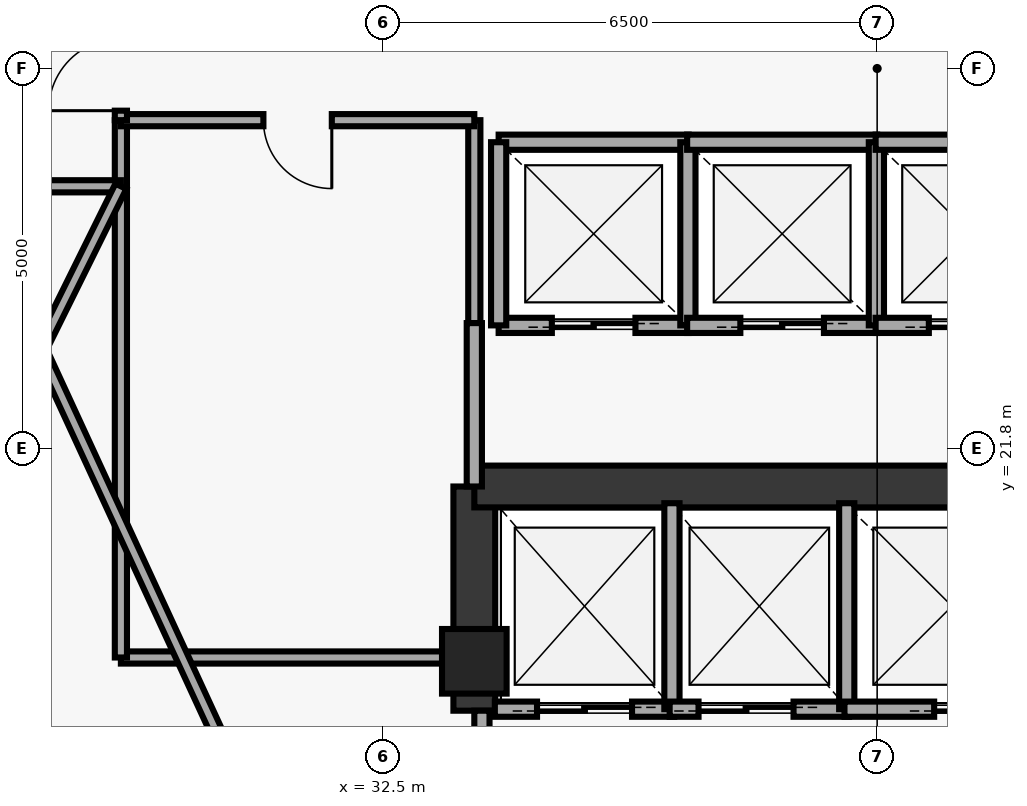
"""IFC4 building model, lengths in metres.
Left out: names, types, materials, properties, quantities, classifications, styles, units other than length and angle.
Written with IfcOpenShell. Run it as: python <this file> out.ifc"""

import sys

from ifc_helpers import new_model, si_unit, direction, frame, frame_2d, origin, origin_2d, place, context, subcontext, project, spatial, rectangle, extrude, element, fill, save


model = new_model("IFC4")
c1 = context("Model", 3, precision=1e-05, world=origin(), true_north=direction((0.0, 1.0)))
c2 = subcontext(c1, "Body", "Model", "MODEL_VIEW")
j1 = project(units=[si_unit("LENGTHUNIT", "METRE"), si_unit("PLANEANGLEUNIT", "RADIAN")], contexts=[c1])
p1 = place(None, origin())
s1 = spatial("IfcSite", under=j1, at=p1, CompositionType="ELEMENT")
p2 = place(p1, origin())
s2 = spatial("IfcBuilding", under=s1, at=p2, CompositionType="ELEMENT")
p3 = place(p2, frame((0.0, 0.0, 251.95)))
s3 = spatial("IfcBuildingStorey", under=s2, at=p3, CompositionType="ELEMENT", Elevation=251.95)
p4 = place(p3, frame((33.7, 19.0, 0.0), z_axis=(0.0, 0.0, 1.0), x_axis=(1.0, 0.0, 0.0)))
e1 = element("IfcColumn", 1, at=p4, inside=s3, PredefinedType="PILASTER", context=c2, shape_type="SweptSolid", body=[
    extrude(rectangle(XDim=0.85, YDim=0.85, at=origin_2d()), origin(), (0.0, 0.0, 1.0), 3.39),
])
p5 = place(p3, frame((33.7, 18.35, 0.0), z_axis=(0.0, 0.0, 1.0), x_axis=(0.0, 1.0, 0.0)))
e2 = element("IfcWall", 2, at=p5, inside=s3, PredefinedType="SHEAR", context=c2, shape_type="SweptSolid", body=[
    extrude(rectangle(XDim=2.95, YDim=0.55, at=frame_2d((1.475, 0.0))), origin(), (0.0, 0.0, 1.0), 3.39),
])
p6 = place(p3, frame((33.7, 21.3, 0.0), z_axis=(0.0, 0.0, 1.0), x_axis=(1.0, 0.0, 0.0)))
e3 = element("IfcWall", 3, at=p6, inside=s3, PredefinedType="SHEAR", context=c2, shape_type="SweptSolid", body=[
    extrude(rectangle(XDim=7.55, YDim=0.55, at=frame_2d((3.775, 0.0))), origin(), (0.0, 0.0, 1.0), 3.39),
])
p7 = place(p3, frame((34.02, 23.42, 0.0), z_axis=(0.0, 0.0, 1.0), x_axis=(1.0, 0.0, 0.0)))
e4 = element("IfcWall", 4, at=p7, inside=s3, PredefinedType="SOLIDWALL", context=c2, shape_type="SweptSolid", body=[
    extrude(rectangle(XDim=2.5, YDim=0.2, at=frame_2d((1.25, 0.0))), origin(), (0.0, 0.0, 1.0), 3.39),
])
p8 = place(p7, frame((0.7, 0.0, 0.0)))
e5 = element("IfcOpeningElement", 5, at=p8, cuts=e4, PredefinedType="OPENING", context=c2, shape_type="SweptSolid", body=[
    extrude(rectangle(XDim=1.1, YDim=2.15, at=frame_2d((0.55, 1.075))), frame((0.0, 0.11, 0.0), z_axis=(0.0, -1.0, 0.0), x_axis=(1.0, 0.0, 0.0)), (0.0, 0.0, 1.0), 0.22),
])
p9 = place(p3, frame((34.02, 25.83, 0.0), z_axis=(0.0, 0.0, 1.0), x_axis=(1.0, 0.0, 0.0)))
e6 = element("IfcWall", 6, at=p9, inside=s3, PredefinedType="SOLIDWALL", context=c2, shape_type="SweptSolid", body=[
    extrude(rectangle(XDim=2.5, YDim=0.2, at=frame_2d((1.25, 0.0))), origin(), (0.0, 0.0, 1.0), 3.39),
])
for number, where, z_axis, x_axis in (
    (7, (34.02, 23.42, 0.0), (0.0, 0.0, 1.0), (0.0, 1.0, 0.0)),
    (8, (36.51, 23.42, 0.0), (0.0, 0.0, 1.0), (0.0, 1.0, 0.0)),
):
    element("IfcWall", number, at=place(p3, frame(where, z_axis=z_axis, x_axis=x_axis)), inside=s3, PredefinedType="SOLIDWALL", context=c2, shape_type="SweptSolid", body=[
        extrude(rectangle(XDim=2.41, YDim=0.2, at=frame_2d((1.205, 0.0))), origin(), (0.0, 0.0, 1.0), 3.39),
    ])
p10 = place(p3, frame((36.5, 23.42, 0.0), z_axis=(0.0, 0.0, 1.0), x_axis=(1.0, 0.0, 0.0)))
e9 = element("IfcWall", 9, at=p10, inside=s3, PredefinedType="SOLIDWALL", context=c2, shape_type="SweptSolid", body=[
    extrude(rectangle(XDim=2.5, YDim=0.2, at=frame_2d((1.25, 0.0))), origin(), (0.0, 0.0, 1.0), 3.39),
])
p11 = place(p10, frame((0.7, 0.0, 0.0)))
e10 = element("IfcOpeningElement", 10, at=p11, cuts=e9, PredefinedType="OPENING", context=c2, shape_type="SweptSolid", body=[
    extrude(rectangle(XDim=1.1, YDim=2.15, at=frame_2d((0.55, 1.075))), frame((0.0, 0.11, 0.0), z_axis=(0.0, -1.0, 0.0), x_axis=(1.0, 0.0, 0.0)), (0.0, 0.0, 1.0), 0.22),
])
p12 = place(p3, frame((36.5, 25.83, 0.0), z_axis=(0.0, 0.0, 1.0), x_axis=(1.0, 0.0, 0.0)))
e11 = element("IfcWall", 11, at=p12, inside=s3, PredefinedType="SOLIDWALL", context=c2, shape_type="SweptSolid", body=[
    extrude(rectangle(XDim=2.5, YDim=0.2, at=frame_2d((1.25, 0.0))), origin(), (0.0, 0.0, 1.0), 3.39),
])
p13 = place(p3, frame((38.99, 23.42, 0.0), z_axis=(0.0, 0.0, 1.0), x_axis=(0.0, 1.0, 0.0)))
e12 = element("IfcWall", 12, at=p13, inside=s3, PredefinedType="SOLIDWALL", context=c2, shape_type="SweptSolid", body=[
    extrude(rectangle(XDim=2.41, YDim=0.2, at=frame_2d((1.205, 0.0))), origin(), (0.0, 0.0, 1.0), 3.39),
])
p14 = place(p3, frame((38.98, 23.42, 0.0), z_axis=(0.0, 0.0, 1.0), x_axis=(1.0, 0.0, 0.0)))
e13 = element("IfcWall", 13, at=p14, inside=s3, PredefinedType="SOLIDWALL", context=c2, shape_type="SweptSolid", body=[
    extrude(rectangle(XDim=2.5, YDim=0.2, at=frame_2d((1.25, 0.0))), origin(), (0.0, 0.0, 1.0), 3.39),
])
p15 = place(p14, frame((0.7, 0.0, 0.0)))
e14 = element("IfcOpeningElement", 14, at=p15, cuts=e13, PredefinedType="OPENING", context=c2, shape_type="SweptSolid", body=[
    extrude(rectangle(XDim=1.1, YDim=2.15, at=frame_2d((0.55, 1.075))), frame((0.0, 0.11, 0.0), z_axis=(0.0, -1.0, 0.0), x_axis=(1.0, 0.0, 0.0)), (0.0, 0.0, 1.0), 0.22),
])
p16 = place(p3, frame((38.98, 25.83, 0.0), z_axis=(0.0, 0.0, 1.0), x_axis=(1.0, 0.0, 0.0)))
e15 = element("IfcWall", 15, at=p16, inside=s3, PredefinedType="SOLIDWALL", context=c2, shape_type="SweptSolid", body=[
    extrude(rectangle(XDim=2.5, YDim=0.2, at=frame_2d((1.25, 0.0))), origin(), (0.0, 0.0, 1.0), 3.39),
])
p17 = place(p3, frame((33.97, 18.37, 0.0), z_axis=(0.0, 0.0, 1.0), x_axis=(1.0, 0.0, 0.0)))
e16 = element("IfcWall", 16, at=p17, inside=s3, PredefinedType="SOLIDWALL", context=c2, shape_type="SweptSolid", body=[
    extrude(rectangle(XDim=2.36, YDim=0.2, at=frame_2d((1.18, 0.0))), origin(), (0.0, 0.0, 1.0), 3.39),
])
p18 = place(p17, frame((0.555, 0.0, 0.0)))
e17 = element("IfcOpeningElement", 17, at=p18, cuts=e16, PredefinedType="OPENING", context=c2, shape_type="SweptSolid", body=[
    extrude(rectangle(XDim=1.25, YDim=2.2, at=frame_2d((0.625, 1.1))), frame((0.0, 0.11, 0.0), z_axis=(0.0, -1.0, 0.0), x_axis=(1.0, 0.0, 0.0)), (0.0, 0.0, 1.0), 0.22),
])
p19 = place(p3, frame((36.3, 18.37, 0.0), z_axis=(0.0, 0.0, 1.0), x_axis=(0.0, 1.0, 0.0)))
e18 = element("IfcWall", 18, at=p19, inside=s3, PredefinedType="SOLIDWALL", context=c2, shape_type="SweptSolid", body=[
    extrude(rectangle(XDim=2.71, YDim=0.2, at=frame_2d((1.355, 0.0))), origin(), (0.0, 0.0, 1.0), 3.39),
])
p20 = place(p3, frame((36.27, 18.37, 0.0), z_axis=(0.0, 0.0, 1.0), x_axis=(1.0, 0.0, 0.0)))
e19 = element("IfcWall", 19, at=p20, inside=s3, PredefinedType="SOLIDWALL", context=c2, shape_type="SweptSolid", body=[
    extrude(rectangle(XDim=2.36, YDim=0.2, at=frame_2d((1.18, 0.0))), origin(), (0.0, 0.0, 1.0), 3.39),
])
p21 = place(p20, frame((0.38, 0.0, 0.0)))
e20 = element("IfcOpeningElement", 20, at=p21, cuts=e19, PredefinedType="OPENING", context=c2, shape_type="SweptSolid", body=[
    extrude(rectangle(XDim=1.25, YDim=2.2, at=frame_2d((0.625, 1.1))), frame((0.0, 0.11, 0.0), z_axis=(0.0, -1.0, 0.0), x_axis=(1.0, 0.0, 0.0)), (0.0, 0.0, 1.0), 0.22),
])
p22 = place(p3, frame((38.6, 18.37, 0.0), z_axis=(0.0, 0.0, 1.0), x_axis=(0.0, 1.0, 0.0)))
e21 = element("IfcWall", 21, at=p22, inside=s3, PredefinedType="SOLIDWALL", context=c2, shape_type="SweptSolid", body=[
    extrude(rectangle(XDim=2.71, YDim=0.2, at=frame_2d((1.355, 0.0))), origin(), (0.0, 0.0, 1.0), 3.39),
])
p23 = place(p3, frame((38.57, 18.37, 0.0), z_axis=(0.0, 0.0, 1.0), x_axis=(1.0, 0.0, 0.0)))
e22 = element("IfcWall", 22, at=p23, inside=s3, PredefinedType="SOLIDWALL", context=c2, shape_type="SweptSolid", body=[
    extrude(rectangle(XDim=2.83, YDim=0.2, at=frame_2d((1.415, 0.0))), origin(), (0.0, 0.0, 1.0), 3.39),
])
p24 = place(p23, frame((1.18, 0.0, 0.0)))
e23 = element("IfcOpeningElement", 23, at=p24, cuts=e22, PredefinedType="OPENING", context=c2, shape_type="SweptSolid", body=[
    extrude(rectangle(XDim=1.35, YDim=2.02, at=frame_2d((0.675, 1.01))), frame((0.0, 0.11, 0.0), z_axis=(0.0, -1.0, 0.0), x_axis=(1.0, 0.0, 0.0)), (0.0, 0.0, 1.0), 0.22),
])
p25 = place(p3, frame((29.05, 19.05, 0.0), z_axis=(0.0, 0.0, 1.0), x_axis=(1.0, 0.0, 0.0)))
e24 = element("IfcWall", 24, at=p25, inside=s3, PredefinedType="PARTITIONING", context=c2, shape_type="SweptSolid", body=[
    extrude(rectangle(XDim=4.65, YDim=0.16, at=frame_2d((2.325, 0.0))), origin(), (0.0, 0.0, 1.0), 3.39),
])
p26 = place(p3, frame((29.05, 19.05, 0.0), z_axis=(0.0, 0.0, 1.0), x_axis=(0.0, 1.0, 0.0)))
e25 = element("IfcWall", 25, at=p26, inside=s3, PredefinedType="PARTITIONING", context=c2, shape_type="SweptSolid", body=[
    extrude(rectangle(XDim=7.07, YDim=0.16, at=frame_2d((3.535, 0.0))), origin(), (0.0, 0.0, 1.0), 3.39),
])
p27 = place(p3, frame((33.7, 23.45, 0.0), z_axis=(0.0, 0.0, 1.0), x_axis=(0.0, 1.0, 0.0)))
e26 = element("IfcWall", 26, at=p27, inside=s3, PredefinedType="PARTITIONING", context=c2, shape_type="SweptSolid", body=[
    extrude(rectangle(XDim=2.67, YDim=0.16, at=frame_2d((1.335, 0.0))), origin(), (0.0, 0.0, 1.0), 2.775),
])
p28 = place(p3, frame((33.7, 26.12, 0.0), z_axis=(0.0, 0.0, 1.0), x_axis=(-1.0, 0.0, 0.0)))
e27 = element("IfcWall", 27, at=p28, inside=s3, PredefinedType="PARTITIONING", context=c2, shape_type="SweptSolid", body=[
    extrude(rectangle(XDim=4.65, YDim=0.16, at=frame_2d((2.325, 0.0))), origin(), (0.0, 0.0, 1.0), 3.39),
])
p29 = place(p28, frame((1.875, 0.0, 0.0)))
e28 = element("IfcOpeningElement", 28, at=p29, cuts=e27, PredefinedType="OPENING", context=c2, shape_type="SweptSolid", body=[
    extrude(rectangle(XDim=0.9, YDim=2.02, at=frame_2d((0.45, 1.01))), frame((0.0, 0.09, 0.0), z_axis=(0.0, -1.0, 0.0), x_axis=(1.0, 0.0, 0.0)), (0.0, 0.0, 1.0), 0.18),
])
p30 = place(p3, frame((33.7, 21.3, 0.0), z_axis=(0.0, 0.0, 1.0), x_axis=(0.0, 1.0, 0.0)))
e29 = element("IfcWall", 29, at=p30, inside=s3, PredefinedType="SOLIDWALL", context=c2, shape_type="SweptSolid", body=[
    extrude(rectangle(XDim=2.15, YDim=0.2, at=frame_2d((1.075, 0.0))), origin(), (0.0, 0.0, 1.0), 2.775),
])
p31 = place(p3, frame((33.8, 15.55, 0.0), z_axis=(0.0, 0.0, 1.0), x_axis=(0.0, 1.0, 0.0)))
e30 = element("IfcWall", 30, at=p31, inside=s3, PredefinedType="SOLIDWALL", context=c2, shape_type="SweptSolid", body=[
    extrude(rectangle(XDim=2.8, YDim=0.2, at=frame_2d((1.4, 0.0))), origin(), (0.0, 0.0, 1.0), 3.39),
])
p32 = place(p3, frame((29.05, 26.12, 0.0), z_axis=(0.0, 0.0, 1.0), x_axis=(0.0, 1.0, 0.0)))
e31 = element("IfcWall", 31, at=p32, inside=s3, PredefinedType="PARTITIONING", context=c2, shape_type="SweptSolid", body=[
    extrude(rectangle(XDim=1.2, YDim=0.16, at=frame_2d((0.6, 0.0))), origin(), (0.0, 0.0, 1.0), 3.39),
])
p33 = place(p32, frame((0.125, 0.0, 0.0)))
e32 = element("IfcOpeningElement", 32, at=p33, cuts=e31, PredefinedType="OPENING", context=c2, shape_type="SweptSolid", body=[
    extrude(rectangle(XDim=0.95, YDim=2.15, at=frame_2d((0.475, 1.075))), frame((0.0, 0.09, 0.0), z_axis=(0.0, -1.0, 0.0), x_axis=(1.0, 0.0, 0.0)), (0.0, 0.0, 1.0), 0.18),
])
p34 = place(p3, frame((27.988, 23.104, 0.0), z_axis=(0.0, 0.0, 1.0), x_axis=(0.418656179426, -0.908144814128, 0.0)))
e33 = element("IfcWall", 33, at=p34, inside=s3, PredefinedType="PARTITIONING", context=c2, shape_type="SweptSolid", body=[
    extrude(rectangle(XDim=7.049, YDim=0.16, at=frame_2d((3.524, 0.0))), origin(), (0.0, 0.0, 1.0), 3.39),
])
p35 = place(p3, frame((26.25, 25.25, 0.0), z_axis=(0.0, 0.0, 1.0), x_axis=(1.0, 0.0, 0.0)))
e34 = element("IfcWall", 34, at=p35, inside=s3, PredefinedType="PARTITIONING", context=c2, shape_type="SweptSolid", body=[
    extrude(rectangle(XDim=2.8, YDim=0.16, at=frame_2d((1.4, 0.0))), origin(), (0.0, 0.0, 1.0), 3.39),
])
p36 = place(p35, frame((0.65, 0.0, 0.0)))
e35 = element("IfcOpeningElement", 35, at=p36, cuts=e34, PredefinedType="OPENING", context=c2, shape_type="SweptSolid", body=[
    extrude(rectangle(XDim=1.0, YDim=2.02, at=frame_2d((0.5, 1.01))), frame((0.0, 0.09, 0.0), z_axis=(0.0, -1.0, 0.0), x_axis=(1.0, 0.0, 0.0)), (0.0, 0.0, 1.0), 0.18),
])
p37 = place(p3, frame((27.988, 23.104, 0.0), z_axis=(0.0, 0.0, 1.0), x_axis=(0.443539160525, 0.896254993337, 0.0)))
e36 = element("IfcWall", 36, at=p37, inside=s3, PredefinedType="PARTITIONING", context=c2, shape_type="SweptSolid", body=[
    extrude(rectangle(XDim=2.394, YDim=0.16, at=frame_2d((1.197, 0.0))), origin(), (0.0, 0.0, 1.0), 3.39),
])
p38 = place(p3, frame((28.832, 15.437, 0.0), z_axis=(0.0, 0.0, 1.0), x_axis=(-0.566023066777, 0.824389403059, 0.0)))
e37 = element("IfcWall", 37, at=p38, inside=s3, PredefinedType="PARTITIONING", context=c2, shape_type="SweptSolid", body=[
    extrude(rectangle(XDim=4.037, YDim=0.125, at=frame_2d((2.019, 0.0))), origin(), (0.0, 0.0, 1.0), 3.39),
])
p39 = place(p38, frame((1.568, 0.0, 0.0)))
e38 = element("IfcOpeningElement", 38, at=p39, cuts=e37, PredefinedType="OPENING", context=c2, shape_type="SweptSolid", body=[
    extrude(rectangle(XDim=0.9, YDim=2.02, at=frame_2d((0.45, 1.01))), frame((0.0, 0.073, 0.0), z_axis=(0.0, -1.0, 0.0), x_axis=(1.0, 0.0, 0.0)), (0.0, 0.0, 1.0), 0.145),
])
p40 = place(p8, origin())
e39 = element("IfcDoor", 39, at=p40, inside=s3, OperationType="DOUBLE_DOOR_SLIDING", PredefinedType="DOOR", context=c2, shape_type="SweptSolid", body=[
    extrude(rectangle(XDim=1.1, YDim=2.15, at=frame_2d((0.55, 1.075))), frame((0.0, 0.025, 0.0), z_axis=(0.0, -1.0, 0.0), x_axis=(1.0, 0.0, 0.0)), (0.0, 0.0, 1.0), 0.05),
])
fill(e5, e39)
p41 = place(p11, origin())
e40 = element("IfcDoor", 40, at=p41, inside=s3, OperationType="DOUBLE_DOOR_SLIDING", PredefinedType="DOOR", context=c2, shape_type="SweptSolid", body=[
    extrude(rectangle(XDim=1.1, YDim=2.15, at=frame_2d((0.55, 1.075))), frame((0.0, 0.025, 0.0), z_axis=(0.0, -1.0, 0.0), x_axis=(1.0, 0.0, 0.0)), (0.0, 0.0, 1.0), 0.05),
])
fill(e10, e40)
p42 = place(p15, origin())
e41 = element("IfcDoor", 41, at=p42, inside=s3, OperationType="DOUBLE_DOOR_SLIDING", PredefinedType="DOOR", context=c2, shape_type="SweptSolid", body=[
    extrude(rectangle(XDim=1.1, YDim=2.15, at=frame_2d((0.55, 1.075))), frame((0.0, 0.025, 0.0), z_axis=(0.0, -1.0, 0.0), x_axis=(1.0, 0.0, 0.0)), (0.0, 0.0, 1.0), 0.05),
])
fill(e14, e41)
p43 = place(p18, origin())
e42 = element("IfcDoor", 42, at=p43, inside=s3, OperationType="DOUBLE_DOOR_SLIDING", PredefinedType="DOOR", context=c2, shape_type="SweptSolid", body=[
    extrude(rectangle(XDim=1.25, YDim=2.2, at=frame_2d((0.625, 1.1))), frame((0.0, 0.025, 0.0), z_axis=(0.0, -1.0, 0.0), x_axis=(1.0, 0.0, 0.0)), (0.0, 0.0, 1.0), 0.05),
])
fill(e17, e42)
p44 = place(p21, origin())
e43 = element("IfcDoor", 43, at=p44, inside=s3, OperationType="DOUBLE_DOOR_SLIDING", PredefinedType="DOOR", context=c2, shape_type="SweptSolid", body=[
    extrude(rectangle(XDim=1.25, YDim=2.2, at=frame_2d((0.625, 1.1))), frame((0.0, 0.025, 0.0), z_axis=(0.0, -1.0, 0.0), x_axis=(1.0, 0.0, 0.0)), (0.0, 0.0, 1.0), 0.05),
])
fill(e20, e43)
p45 = place(p24, origin())
e44 = element("IfcDoor", 44, at=p45, inside=s3, OperationType="DOUBLE_DOOR_SLIDING", PredefinedType="DOOR", context=c2, shape_type="SweptSolid", body=[
    extrude(rectangle(XDim=1.35, YDim=2.02, at=frame_2d((0.675, 1.01))), frame((0.0, 0.025, 0.0), z_axis=(0.0, -1.0, 0.0), x_axis=(1.0, 0.0, 0.0)), (0.0, 0.0, 1.0), 0.05),
])
fill(e23, e44)
p46 = place(p29, origin())
e45 = element("IfcDoor", 45, at=p46, inside=s3, OperationType="SINGLE_SWING_LEFT", PredefinedType="DOOR", context=c2, shape_type="SweptSolid", body=[
    extrude(rectangle(XDim=0.9, YDim=2.02, at=frame_2d((0.45, 1.01))), frame((0.0, 0.025, 0.0), z_axis=(0.0, -1.0, 0.0), x_axis=(1.0, 0.0, 0.0)), (0.0, 0.0, 1.0), 0.05),
])
fill(e28, e45)
p47 = place(p33, origin())
e46 = element("IfcDoor", 46, at=p47, inside=s3, OperationType="SINGLE_SWING_RIGHT", PredefinedType="DOOR", context=c2, shape_type="SweptSolid", body=[
    extrude(rectangle(XDim=0.95, YDim=2.15, at=frame_2d((0.475, 1.075))), frame((0.0, 0.025, 0.0), z_axis=(0.0, -1.0, 0.0), x_axis=(1.0, 0.0, 0.0)), (0.0, 0.0, 1.0), 0.05),
])
fill(e32, e46)
save(model, sys.argv[1])
